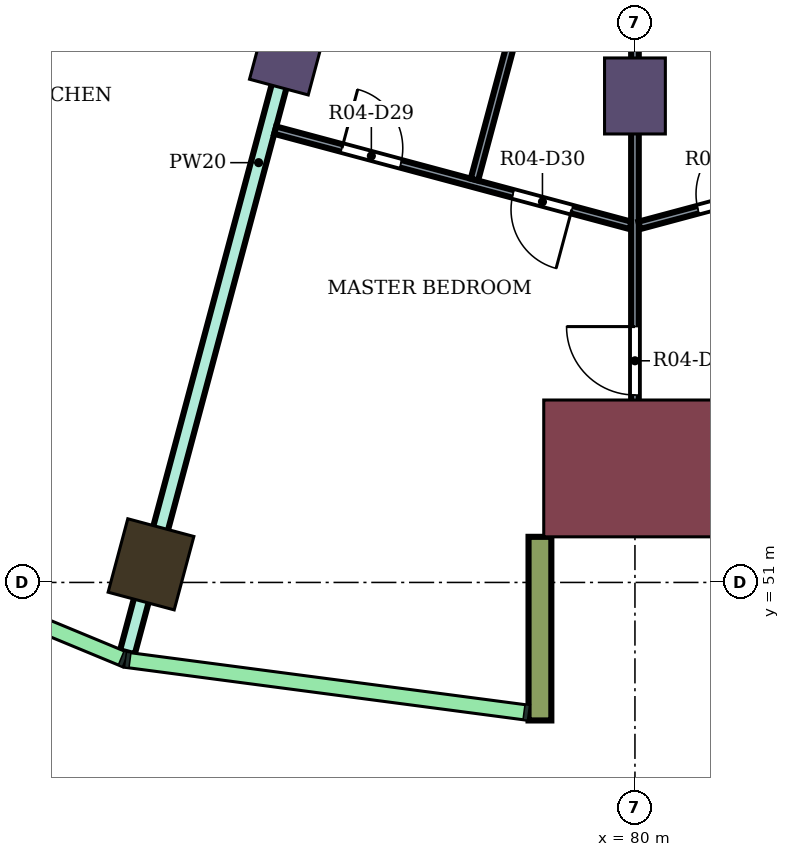
"""IFC4 building model, lengths in metres.
Left out: names, types, materials, properties, quantities, classifications, styles, units other than length and angle.
Written with IfcOpenShell. Run it as: python <this file> out.ifc"""

import sys

from ifc_helpers import new_model, si_unit, direction, frame, frame_2d, origin, origin_2d, place, context, subcontext, project, spatial, rectangle, extrude, element, fill, save


model = new_model("IFC4")
c1 = context("Model", 3, precision=1e-05, world=origin(), true_north=direction((0.0, 1.0)))
c2 = subcontext(c1, "Body", "Model", "MODEL_VIEW")
j1 = project(units=[si_unit("LENGTHUNIT", "METRE"), si_unit("PLANEANGLEUNIT", "RADIAN")], contexts=[c1])
p1 = place(None, origin())
s1 = spatial("IfcSite", under=j1, at=p1, CompositionType="ELEMENT")
p2 = place(p1, origin())
s2 = spatial("IfcBuilding", under=s1, at=p2, CompositionType="ELEMENT")
p3 = place(p2, frame((0.0, 0.0, 202.8)))
s3 = spatial("IfcBuildingStorey", under=s2, at=p3, CompositionType="ELEMENT", Elevation=202.8)
p4 = place(p3, frame((73.633, 51.238, 0.0), z_axis=(0.0, 0.0, 1.0), x_axis=(-0.258819045103, -0.965925826289, 0.0)))
e1 = element("IfcColumn", 1, at=p4, inside=s3, PredefinedType="COLUMN", context=c2, shape_type="SweptSolid", body=[
    extrude(rectangle(XDim=1.0, YDim=0.9, at=origin_2d()), origin(), (0.0, 0.0, 1.0), 4.1),
])
for number, where, z_axis, x_axis in (
    (2, (75.445, 58.0, 0.0), (0.0, 0.0, 1.0), (-0.259, -0.966, 0.0)),
    (3, (80.0, 57.4, 0.0), (0.0, 0.0, 1.0), (0.0, -1.0, 0.0)),
):
    element("IfcColumn", number, at=place(p3, frame(where, z_axis=z_axis, x_axis=x_axis)), inside=s3, PredefinedType="COLUMN", context=c2, shape_type="SweptSolid", body=[
        extrude(rectangle(XDim=1.0, YDim=0.8, at=origin_2d()), origin(), (0.0, 0.0, 1.0), 4.1),
    ])
p5 = place(p3, frame((80.0, 52.5, 0.0), z_axis=(0.0, 0.0, 1.0), x_axis=(0.0, -1.0, 0.0)))
e4 = element("IfcColumn", 4, at=p5, inside=s3, PredefinedType="COLUMN", context=c2, shape_type="SweptSolid", body=[
    extrude(rectangle(XDim=1.8, YDim=2.4, at=origin_2d()), origin(), (0.0, 0.0, 1.0), 4.1),
])
p6 = place(p3, frame((78.75, 51.6, 0.0), z_axis=(0.0, 0.0, 1.0), x_axis=(0.0, -1.0, 0.0)))
e5 = element("IfcWall", 5, at=p6, inside=s3, PredefinedType="NOTDEFINED", context=c2, shape_type="SweptSolid", body=[
    extrude(rectangle(XDim=2.416, YDim=0.3, at=frame_2d((1.208, 0.0))), origin(), (0.0, 0.0, 1.0), 4.1),
])
p7 = place(p3, frame((73.323, 50.081, 0.0), z_axis=(0.0, 0.0, 1.0), x_axis=(0.258888262922, 0.965907276772, 0.0)))
e6 = element("IfcWall", 6, at=p7, inside=s3, PredefinedType="PARTITIONING", context=c2, shape_type="SweptSolid", body=[
    extrude(rectangle(XDim=13.338, YDim=0.2, at=frame_2d((6.669, 0.0))), origin(), (0.0, 0.0, 1.0), 3.65),
])
p8 = place(p3, frame((67.101, 52.659, 0.0), z_axis=(0.0, 0.0, 1.0), x_axis=(0.500035926033, 0.866004660886, 0.0)))
e7 = element("IfcWall", 7, at=p8, inside=s3, PredefinedType="PARTITIONING", context=c2, shape_type="SweptSolid", body=[
    extrude(rectangle(XDim=12.876, YDim=0.1, at=frame_2d((6.438, 0.0))), origin(), (0.0, 0.0, 1.0), 3.65),
])
p9 = place(p8, frame((2.401, 0.0, 0.0)))
e8 = element("IfcOpeningElement", 8, at=p9, cuts=e7, PredefinedType="OPENING", context=c2, shape_type="SweptSolid", body=[
    extrude(rectangle(XDim=0.9, YDim=2.1, at=frame_2d((0.45, 1.05))), frame((0.0, 0.06, 0.0), z_axis=(0.0, -1.0, 0.0), x_axis=(1.0, 0.0, 0.0)), (0.0, 0.0, 1.0), 0.12),
])
p10 = place(p8, frame((9.936, 0.0, 0.0)))
e9 = element("IfcOpeningElement", 9, at=p10, cuts=e7, PredefinedType="OPENING", context=c2, shape_type="SweptSolid", body=[
    extrude(rectangle(XDim=0.8, YDim=2.1, at=frame_2d((0.4, 1.05))), frame((0.0, 0.06, 0.0), z_axis=(0.0, -1.0, 0.0), x_axis=(1.0, 0.0, 0.0)), (0.0, 0.0, 1.0), 0.12),
])
p11 = place(p3, frame((75.267, 56.95, 0.0), z_axis=(0.0, 0.0, 1.0), x_axis=(0.965900084933, -0.25891509405, 0.0)))
e10 = element("IfcWall", 10, at=p11, inside=s3, PredefinedType="PARTITIONING", context=c2, shape_type="SweptSolid", body=[
    extrude(rectangle(XDim=4.84, YDim=0.1, at=frame_2d((2.42, 0.0))), origin(), (0.0, 0.0, 1.0), 3.65),
])
p12 = place(p11, frame((0.91, 0.0, 0.0)))
e11 = element("IfcOpeningElement", 11, at=p12, cuts=e10, PredefinedType="OPENING", context=c2, shape_type="SweptSolid", body=[
    extrude(rectangle(XDim=0.8, YDim=2.1, at=frame_2d((0.4, 1.05))), frame((0.0, 0.06, 0.0), z_axis=(0.0, -1.0, 0.0), x_axis=(1.0, 0.0, 0.0)), (0.0, 0.0, 1.0), 0.12),
])
p13 = place(p11, frame((3.24, 0.0, 0.0)))
e12 = element("IfcOpeningElement", 12, at=p13, cuts=e10, PredefinedType="OPENING", context=c2, shape_type="SweptSolid", body=[
    extrude(rectangle(XDim=0.8, YDim=2.1, at=frame_2d((0.4, 1.05))), frame((0.0, 0.06, 0.0), z_axis=(0.0, -1.0, 0.0), x_axis=(1.0, 0.0, 0.0)), (0.0, 0.0, 1.0), 0.12),
])
p14 = place(p3, frame((77.888, 56.3, 0.0), z_axis=(0.0, 0.0, 1.0), x_axis=(0.258885575383, 0.965907997098, 0.0)))
e13 = element("IfcWall", 13, at=p14, inside=s3, PredefinedType="PARTITIONING", context=c2, shape_type="SweptSolid", body=[
    extrude(rectangle(XDim=6.15, YDim=0.1, at=frame_2d((3.075, 0.0))), origin(), (0.0, 0.0, 1.0), 3.65),
])
p15 = place(p3, frame((80.0, 51.8, 0.0), z_axis=(0.0, 0.0, 1.0), x_axis=(0.0, 1.0, 0.0)))
e14 = element("IfcWall", 14, at=p15, inside=s3, PredefinedType="PARTITIONING", context=c2, shape_type="SweptSolid", body=[
    extrude(rectangle(XDim=10.404, YDim=0.1, at=frame_2d((5.202, 0.0))), origin(), (0.0, 0.0, 1.0), 3.65),
])
p16 = place(p15, frame((1.666, 0.0, 0.0)))
e15 = element("IfcOpeningElement", 15, at=p16, cuts=e14, PredefinedType="OPENING", context=c2, shape_type="SweptSolid", body=[
    extrude(rectangle(XDim=0.9, YDim=2.1, at=frame_2d((0.45, 1.05))), frame((0.0, 0.06, 0.0), z_axis=(0.0, -1.0, 0.0), x_axis=(1.0, 0.0, 0.0)), (0.0, 0.0, 1.0), 0.12),
])
p17 = place(p3, frame((80.058, 55.698, 0.0), z_axis=(0.0, 0.0, 1.0), x_axis=(0.965970105839, 0.258653734992, 0.0)))
e16 = element("IfcWall", 16, at=p17, inside=s3, PredefinedType="PARTITIONING", context=c2, shape_type="SweptSolid", body=[
    extrude(rectangle(XDim=4.89, YDim=0.1, at=frame_2d((2.445, 0.0))), origin(), (0.0, 0.0, 1.0), 3.65),
])
p18 = place(p17, frame((0.8, 0.0, 0.0)))
e17 = element("IfcOpeningElement", 17, at=p18, cuts=e16, PredefinedType="OPENING", context=c2, shape_type="SweptSolid", body=[
    extrude(rectangle(XDim=0.8, YDim=2.1, at=frame_2d((0.4, 1.05))), frame((0.0, 0.06, 0.0), z_axis=(0.0, -1.0, 0.0), x_axis=(1.0, 0.0, 0.0)), (0.0, 0.0, 1.0), 0.12),
])
p19 = place(p3, frame((80.52, 62.24, 0.0), z_axis=(0.0, 0.0, 1.0), x_axis=(0.258885575383, -0.965907997098, 0.0)))
e18 = element("IfcWall", 18, at=p19, inside=s3, PredefinedType="PARTITIONING", context=c2, shape_type="SweptSolid", body=[
    extrude(rectangle(XDim=6.15, YDim=0.1, at=frame_2d((3.075, 0.0))), origin(), (0.0, 0.0, 1.0), 3.65),
])
p20 = place(p18, origin())
e19 = element("IfcDoor", 19, at=p20, inside=s3, OperationType="SINGLE_SWING_RIGHT", PredefinedType="DOOR", context=c2, shape_type="SweptSolid", body=[
    extrude(rectangle(XDim=0.8, YDim=2.1, at=frame_2d((0.4, 1.05))), frame((0.0, 0.025, 0.0), z_axis=(0.0, -1.0, 0.0), x_axis=(1.0, 0.0, 0.0)), (0.0, 0.0, 1.0), 0.05),
])
fill(e17, e19)
p21 = place(p16, origin())
e20 = element("IfcDoor", 20, at=p21, inside=s3, OperationType="SINGLE_SWING_RIGHT", PredefinedType="DOOR", context=c2, shape_type="SweptSolid", body=[
    extrude(rectangle(XDim=0.9, YDim=2.1, at=frame_2d((0.45, 1.05))), frame((0.0, 0.025, 0.0), z_axis=(0.0, -1.0, 0.0), x_axis=(1.0, 0.0, 0.0)), (0.0, 0.0, 1.0), 0.05),
])
fill(e15, e20)
p22 = place(p12, origin())
e21 = element("IfcDoor", 21, at=p22, inside=s3, OperationType="SINGLE_SWING_LEFT", PredefinedType="DOOR", context=c2, shape_type="SweptSolid", body=[
    extrude(rectangle(XDim=0.8, YDim=2.1, at=frame_2d((0.4, 1.05))), frame((0.0, 0.025, 0.0), z_axis=(0.0, -1.0, 0.0), x_axis=(1.0, 0.0, 0.0)), (0.0, 0.0, 1.0), 0.05),
])
fill(e11, e21)
p23 = place(p13, frame((0.8, 0.0, 0.0), z_axis=(0.0, 0.0, 1.0), x_axis=(-1.0, 0.0, 0.0)))
e22 = element("IfcDoor", 22, at=p23, inside=s3, OperationType="SINGLE_SWING_LEFT", PredefinedType="DOOR", context=c2, shape_type="SweptSolid", body=[
    extrude(rectangle(XDim=0.8, YDim=2.1, at=frame_2d((0.4, 1.05))), frame((0.0, 0.025, 0.0), z_axis=(0.0, -1.0, 0.0), x_axis=(1.0, 0.0, 0.0)), (0.0, 0.0, 1.0), 0.05),
])
fill(e12, e22)
save(model, sys.argv[1])
